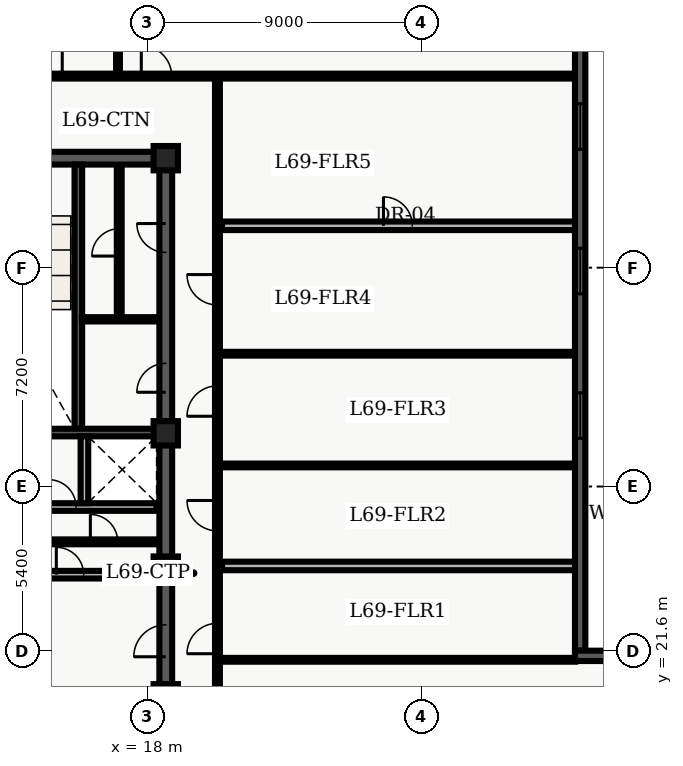
"""IFC4 building model, lengths in metres.
Left out: names, types, materials, properties, quantities, classifications, styles, units other than length and angle.
Written with IfcOpenShell. Run it as: python <this file> out.ifc"""

import sys

from ifc_helpers import new_model, entity, si_unit, converted_unit, direction, frame, origin_with_axes, origin_2d_with_axis, place, context, subcontext, project, spatial, polyline, rectangle, outline, extrude, element, fill, save


model = new_model("IFC4")
c1 = context("Model", 3, precision=1e-05, world=origin_with_axes(), true_north=direction((0.0, 1.0)))
c2 = subcontext(c1, "Body", "Model", "MODEL_VIEW")
j1 = project(units=[si_unit("LENGTHUNIT", "METRE"), converted_unit("PLANEANGLEUNIT", "DEGREE", entity("IfcPlaneAngleMeasure", 0.017), si_unit("PLANEANGLEUNIT", "RADIAN"), dimensions=[0, 0, 0, 0, 0, 0, 0])], contexts=[c1])
p1 = place(None, origin_with_axes())
s1 = spatial("IfcSite", under=j1, at=p1, CompositionType="ELEMENT")
p2 = place(p1, origin_with_axes())
s2 = spatial("IfcBuilding", under=s1, at=p2, CompositionType="ELEMENT")
p3 = place(p2, frame((0.0, 0.0, 280.2), z_axis=(0.0, 0.0, 1.0), x_axis=(1.0, 0.0, 0.0)))
s3 = spatial("IfcBuildingStorey", under=s2, at=p3, CompositionType="ELEMENT", Elevation=280.2)
p4 = place(p3, frame((11.4, 37.8, 0.0), z_axis=(0.0, 0.0, 1.0), x_axis=(1.0, 0.0, 0.0)))
e1 = element("IfcWall", 1, at=p4, inside=s3, PredefinedType="SHEAR", context=c2, shape_type="SweptSolid", body=[
    extrude(outline(polyline([(0.0, -0.21), (7.2, -0.21), (7.2, 0.21), (0.0, 0.21), (0.0, -0.21)])), origin_with_axes(), (0.0, 0.0, 1.0), 3.66),
])
p5 = place(p4, frame((2.625, 0.0, 0.0), z_axis=(0.0, 0.0, 1.0), x_axis=(1.0, 0.0, 0.0)))
e2 = element("IfcOpeningElement", 2, at=p5, cuts=e1, PredefinedType="OPENING", context=c2, shape_type="SweptSolid", body=[
    extrude(rectangle(XDim=1.05, YDim=0.44, at=origin_2d_with_axis()), origin_with_axes(), (0.0, 0.0, 1.0), 2.15),
])
p6 = place(p3, frame((18.6, 10.8, 0.0), z_axis=(0.0, 0.0, 1.0), x_axis=(0.0, 1.0, 0.0)))
e3 = element("IfcWall", 3, at=p6, inside=s3, PredefinedType="SHEAR", context=c2, shape_type="SweptSolid", body=[
    extrude(outline(polyline([(0.0, -0.21), (13.5, -0.21), (13.5, 0.21), (0.0, 0.21), (0.0, -0.21)])), origin_with_axes(), (0.0, 0.0, 1.0), 3.66),
])
p7 = place(p6, frame((1.3, 0.0, 0.0), z_axis=(0.0, 0.0, 1.0), x_axis=(1.0, 0.0, 0.0)))
e4 = element("IfcOpeningElement", 4, at=p7, cuts=e3, PredefinedType="OPENING", context=c2, shape_type="SweptSolid", body=[
    extrude(rectangle(XDim=1.1, YDim=0.44, at=origin_2d_with_axis()), origin_with_axes(), (0.0, 0.0, 1.0), 2.15),
])
p8 = place(p6, frame((3.4, 0.0, 0.0), z_axis=(0.0, 0.0, 1.0), x_axis=(1.0, 0.0, 0.0)))
e5 = element("IfcOpeningElement", 5, at=p8, cuts=e3, PredefinedType="OPENING", context=c2, shape_type="SweptSolid", body=[
    extrude(rectangle(XDim=1.1, YDim=0.44, at=origin_2d_with_axis()), origin_with_axes(), (0.0, 0.0, 1.0), 2.15),
])
p9 = place(p6, frame((11.125, 0.0, 0.0), z_axis=(0.0, 0.0, 1.0), x_axis=(1.0, 0.0, 0.0)))
e6 = element("IfcOpeningElement", 6, at=p9, cuts=e3, PredefinedType="OPENING", context=c2, shape_type="SweptSolid", body=[
    extrude(rectangle(XDim=1.05, YDim=0.44, at=origin_2d_with_axis()), origin_with_axes(), (0.0, 0.0, 1.0), 2.15),
])
p10 = place(p6, frame((6.675, 0.0, 0.0), z_axis=(0.0, 0.0, 1.0), x_axis=(1.0, 0.0, 0.0)))
e7 = element("IfcOpeningElement", 7, at=p10, cuts=e3, PredefinedType="OPENING", context=c2, shape_type="SweptSolid", body=[
    extrude(rectangle(XDim=0.95, YDim=0.44, at=origin_2d_with_axis()), origin_with_axes(), (0.0, 0.0, 1.0), 2.15),
])
p11 = place(p3, frame((18.6, 24.3, 0.0), z_axis=(0.0, 0.0, 1.0), x_axis=(0.0, 1.0, 0.0)))
e8 = element("IfcWall", 8, at=p11, inside=s3, PredefinedType="SHEAR", context=c2, shape_type="SweptSolid", body=[
    extrude(outline(polyline([(0.0, -0.21), (13.5, -0.21), (13.5, 0.21), (0.0, 0.21), (0.0, -0.21)])), origin_with_axes(), (0.0, 0.0, 1.0), 3.66),
])
p12 = place(p11, frame((6.275, 0.0, 0.0), z_axis=(0.0, 0.0, 1.0), x_axis=(1.0, 0.0, 0.0)))
e9 = element("IfcOpeningElement", 9, at=p12, cuts=e8, PredefinedType="OPENING", context=c2, shape_type="SweptSolid", body=[
    extrude(rectangle(XDim=0.95, YDim=0.44, at=origin_2d_with_axis()), origin_with_axes(), (0.0, 0.0, 1.0), 2.15),
])
p13 = place(p11, frame((10.875, 0.0, 0.0), z_axis=(0.0, 0.0, 1.0), x_axis=(1.0, 0.0, 0.0)))
e10 = element("IfcOpeningElement", 10, at=p13, cuts=e8, PredefinedType="OPENING", context=c2, shape_type="SweptSolid", body=[
    extrude(rectangle(XDim=0.95, YDim=0.44, at=origin_2d_with_axis()), origin_with_axes(), (0.0, 0.0, 1.0), 2.15),
])
p14 = place(p3, frame((15.725, 28.9, 0.0), z_axis=(0.0, 0.0, 1.0), x_axis=(0.0, 1.0, 0.0)))
e11 = element("IfcWall", 11, at=p14, inside=s3, PredefinedType="SHEAR", context=c2, shape_type="SweptSolid", body=[
    extrude(outline(polyline([(0.0, -0.125), (8.69, -0.125), (8.69, 0.125), (0.0, 0.125), (0.0, -0.125)])), origin_with_axes(), (0.0, 0.0, 1.0), 3.66),
])
p15 = place(p3, frame((11.61, 28.775, 0.0), z_axis=(0.0, 0.0, 1.0), x_axis=(1.0, 0.0, 0.0)))
e12 = element("IfcWall", 12, at=p15, inside=s3, PredefinedType="SHEAR", context=c2, shape_type="SweptSolid", body=[
    extrude(outline(polyline([(0.0, -0.125), (6.78, -0.125), (6.78, 0.125), (0.0, 0.125), (0.0, -0.125)])), origin_with_axes(), (0.0, 0.0, 1.0), 3.66),
])
p16 = place(p3, frame((11.7, 24.1, 0.0), z_axis=(0.0, 0.0, 1.0), x_axis=(1.0, 0.0, 0.0)))
e13 = element("IfcWall", 13, at=p16, inside=s3, PredefinedType="SOLIDWALL", context=c2, shape_type="SweptSolid", body=[
    extrude(outline(polyline([(0.0, -0.125), (6.6, -0.125), (6.6, 0.125), (0.0, 0.125), (0.0, -0.125)])), origin_with_axes(), (0.0, 0.0, 1.0), 2.7),
])
p17 = place(p16, frame((3.75, 0.0, 0.0), z_axis=(0.0, 0.0, 1.0), x_axis=(1.0, 0.0, 0.0)))
e14 = element("IfcOpeningElement", 14, at=p17, cuts=e13, PredefinedType="OPENING", context=c2, shape_type="SweptSolid", body=[
    extrude(rectangle(XDim=0.9, YDim=0.27, at=origin_2d_with_axis()), origin_with_axes(), (0.0, 0.0, 1.0), 2.15),
])
p18 = place(p3, frame((11.7, 26.325, 0.0), z_axis=(0.0, 0.0, 1.0), x_axis=(1.0, 0.0, 0.0)))
e15 = element("IfcWall", 15, at=p18, inside=s3, PredefinedType="SOLIDWALL", context=c2, shape_type="SweptSolid", body=[
    extrude(outline(polyline([(0.0, -0.125), (6.6, -0.125), (6.6, 0.125), (0.0, 0.125), (0.0, -0.125)])), origin_with_axes(), (0.0, 0.0, 1.0), 2.7),
])
p19 = place(p18, frame((3.5, 0.0, 0.0), z_axis=(0.0, 0.0, 1.0), x_axis=(1.0, 0.0, 0.0)))
e16 = element("IfcOpeningElement", 16, at=p19, cuts=e15, PredefinedType="OPENING", context=c2, shape_type="SweptSolid", body=[
    extrude(rectangle(XDim=0.9, YDim=0.27, at=origin_2d_with_axis()), origin_with_axes(), (0.0, 0.0, 1.0), 2.15),
])
p20 = place(p3, frame((15.925, 26.45, 0.0), z_axis=(0.0, 0.0, 1.0), x_axis=(0.0, 1.0, 0.0)))
e17 = element("IfcWall", 17, at=p20, inside=s3, PredefinedType="SOLIDWALL", context=c2, shape_type="SweptSolid", body=[
    extrude(outline(polyline([(0.0, -0.125), (2.2, -0.125), (2.2, 0.125), (0.0, 0.125), (0.0, -0.125)])), origin_with_axes(), (0.0, 0.0, 1.0), 2.7),
])
for number, where, z_axis, x_axis in (
    (18, (18.6, 20.1, 0.0), (0.0, 0.0, 1.0), (1.0, 0.0, 0.0)),
    (19, (18.6, 24.3, 0.0), (0.0, 0.0, 1.0), (1.0, 0.0, 0.0)),
    (20, (18.6, 28.75, 0.0), (0.0, 0.0, 1.0), (1.0, 0.0, 0.0)),
    (21, (18.6, 37.8, 0.0), (0.0, 0.0, 1.0), (1.0, 0.0, 0.0)),
):
    element("IfcColumn", number, at=place(p3, frame(where, z_axis=z_axis, x_axis=x_axis)), inside=s3, PredefinedType="COLUMN", context=c2, shape_type="SweptSolid", body=[
        extrude(rectangle(XDim=0.8, YDim=0.8, at=origin_2d_with_axis()), origin_with_axes(), (0.0, 0.0, 1.0), 3.9),
    ])
p21 = place(p3, frame((14.62, 25.18, 0.0), z_axis=(0.0, 0.0, 1.0), x_axis=(1.0, 0.0, 0.0)))
e22 = element("IfcWall", 22, at=p21, inside=s3, PredefinedType="PARTITIONING", context=c2, shape_type="SweptSolid", body=[
    extrude(outline(polyline([(0.0, -0.08), (3.68, -0.08), (3.68, 0.08), (0.0, 0.08), (0.0, -0.08)])), origin_with_axes(), (0.0, 0.0, 1.0), 2.7),
])
p22 = place(p21, frame((1.95, 0.0, 0.0), z_axis=(0.0, 0.0, 1.0), x_axis=(1.0, 0.0, 0.0)))
e23 = element("IfcOpeningElement", 23, at=p22, cuts=e22, PredefinedType="OPENING", context=c2, shape_type="SweptSolid", body=[
    extrude(rectangle(XDim=0.9, YDim=0.18, at=origin_2d_with_axis()), origin_with_axes(), (0.0, 0.0, 1.0), 2.15),
])
p23 = place(p3, frame((15.84, 32.5, 0.0), z_axis=(0.0, 0.0, 1.0), x_axis=(1.0, 0.0, 0.0)))
e24 = element("IfcWall", 24, at=p23, inside=s3, PredefinedType="PARTITIONING", context=c2, shape_type="SweptSolid", body=[
    extrude(outline(polyline([(0.0, -0.07), (2.46, -0.07), (2.46, 0.07), (0.0, 0.07), (0.0, -0.07)])), origin_with_axes(), (0.0, 0.0, 1.0), 2.7),
])
p24 = place(p3, frame((17.07, 32.58, 0.0), z_axis=(0.0, 0.0, 1.0), x_axis=(0.0, 1.0, 0.0)))
e25 = element("IfcWall", 25, at=p24, inside=s3, PredefinedType="PARTITIONING", context=c2, shape_type="SweptSolid", body=[
    extrude(outline(polyline([(0.0, -0.08), (4.92, -0.08), (4.92, 0.08), (0.0, 0.08), (0.0, -0.08)])), origin_with_axes(), (0.0, 0.0, 1.0), 2.7),
])
p25 = place(p24, frame((2.45, 0.0, 0.0), z_axis=(0.0, 0.0, 1.0), x_axis=(1.0, 0.0, 0.0)))
e26 = element("IfcOpeningElement", 26, at=p25, cuts=e25, PredefinedType="OPENING", context=c2, shape_type="SweptSolid", body=[
    extrude(rectangle(XDim=0.9, YDim=0.18, at=origin_2d_with_axis()), origin_with_axes(), (0.0, 0.0, 1.0), 2.15),
])
p26 = place(p3, frame((8.135, 40.5, 0.0), z_axis=(0.0, 0.0, 1.0), x_axis=(1.0, 0.0, 0.0)))
e27 = element("IfcWall", 27, at=p26, inside=s3, PredefinedType="PARTITIONING", context=c2, shape_type="SweptSolid", body=[
    extrude(outline(polyline([(0.0, -0.08), (23.93, -0.08), (23.93, 0.08), (0.0, 0.08), (0.0, -0.08)])), origin_with_axes(), (0.0, 0.0, 1.0), 2.7),
])
p27 = place(p26, frame((0.871, 0.0, 0.0), z_axis=(0.0, 0.0, 1.0), x_axis=(1.0, 0.0, 0.0)))
e28 = element("IfcOpeningElement", 28, at=p27, cuts=e27, PredefinedType="OPENING", context=c2, shape_type="SweptSolid", body=[
    extrude(rectangle(XDim=1.0, YDim=0.18, at=origin_2d_with_axis()), origin_with_axes(), (0.0, 0.0, 1.0), 2.15),
])
p28 = place(p26, frame((6.56, 0.0, 0.0), z_axis=(0.0, 0.0, 1.0), x_axis=(1.0, 0.0, 0.0)))
e29 = element("IfcOpeningElement", 29, at=p28, cuts=e27, PredefinedType="OPENING", context=c2, shape_type="SweptSolid", body=[
    extrude(rectangle(XDim=1.0, YDim=0.18, at=origin_2d_with_axis()), origin_with_axes(), (0.0, 0.0, 1.0), 2.15),
])
p29 = place(p26, frame((10.16, 0.0, 0.0), z_axis=(0.0, 0.0, 1.0), x_axis=(1.0, 0.0, 0.0)))
e30 = element("IfcOpeningElement", 30, at=p29, cuts=e27, PredefinedType="OPENING", context=c2, shape_type="SweptSolid", body=[
    extrude(rectangle(XDim=1.0, YDim=0.18, at=origin_2d_with_axis()), origin_with_axes(), (0.0, 0.0, 1.0), 2.15),
])
p30 = place(p3, frame((20.3, 7.8, 0.0), z_axis=(0.0, 0.0, 1.0), x_axis=(0.0, 1.0, 0.0)))
e31 = element("IfcWall", 31, at=p30, inside=s3, PredefinedType="PARTITIONING", context=c2, shape_type="SweptSolid", body=[
    extrude(outline(polyline([(0.0, -0.08), (32.7, -0.08), (32.7, 0.08), (0.0, 0.08), (0.0, -0.08)])), origin_with_axes(), (0.0, 0.0, 1.0), 2.7),
])
p31 = place(p30, frame((14.2, 0.0, 0.0), z_axis=(0.0, 0.0, 1.0), x_axis=(1.0, 0.0, 0.0)))
e32 = element("IfcOpeningElement", 32, at=p31, cuts=e31, PredefinedType="OPENING", context=c2, shape_type="SweptSolid", body=[
    extrude(rectangle(XDim=1.0, YDim=0.18, at=origin_2d_with_axis()), origin_with_axes(), (0.0, 0.0, 1.0), 2.15),
])
p32 = place(p30, frame((18.24, 0.0, 0.0), z_axis=(0.0, 0.0, 1.0), x_axis=(1.0, 0.0, 0.0)))
e33 = element("IfcOpeningElement", 33, at=p32, cuts=e31, PredefinedType="OPENING", context=c2, shape_type="SweptSolid", body=[
    extrude(rectangle(XDim=1.0, YDim=0.18, at=origin_2d_with_axis()), origin_with_axes(), (0.0, 0.0, 1.0), 2.15),
])
p33 = place(p30, frame((22.011, 0.0, 0.0), z_axis=(0.0, 0.0, 1.0), x_axis=(1.0, 0.0, 0.0)))
e34 = element("IfcOpeningElement", 34, at=p33, cuts=e31, PredefinedType="OPENING", context=c2, shape_type="SweptSolid", body=[
    extrude(rectangle(XDim=1.0, YDim=0.18, at=origin_2d_with_axis()), origin_with_axes(), (0.0, 0.0, 1.0), 2.15),
])
p34 = place(p30, frame((25.672, 0.0, 0.0), z_axis=(0.0, 0.0, 1.0), x_axis=(1.0, 0.0, 0.0)))
e35 = element("IfcOpeningElement", 35, at=p34, cuts=e31, PredefinedType="OPENING", context=c2, shape_type="SweptSolid", body=[
    extrude(rectangle(XDim=1.0, YDim=0.18, at=origin_2d_with_axis()), origin_with_axes(), (0.0, 0.0, 1.0), 2.15),
])
p35 = place(p30, frame((6.675, 0.0, 0.0), z_axis=(0.0, 0.0, 1.0), x_axis=(1.0, 0.0, 0.0)))
e36 = element("IfcOpeningElement", 36, at=p35, cuts=e31, PredefinedType="OPENING", context=c2, shape_type="SweptSolid", body=[
    extrude(rectangle(XDim=1.05, YDim=0.18, at=origin_2d_with_axis()), origin_with_axes(), (0.0, 0.0, 1.0), 2.15),
])
p36 = place(p3, frame((17.029, 40.6, 0.0), z_axis=(0.0, 0.0, 1.0), x_axis=(0.0, 1.0, 0.0)))
e37 = element("IfcWall", 37, at=p36, inside=s3, PredefinedType="PARTITIONING", context=c2, shape_type="SweptSolid", body=[
    extrude(outline(polyline([(0.0, -0.062), (5.42, -0.062), (5.42, 0.062), (0.0, 0.062), (0.0, -0.062)])), origin_with_axes(), (0.0, 0.0, 1.0), 2.7),
])
p37 = place(p3, frame((20.45, 24.387, 0.0), z_axis=(0.0, 0.0, 1.0), x_axis=(1.0, 0.0, 0.0)))
e38 = element("IfcWall", 38, at=p37, inside=s3, PredefinedType="PARTITIONING", context=c2, shape_type="SweptSolid", body=[
    extrude(outline(polyline([(0.0, -0.14), (11.615, -0.14), (11.615, 0.14), (0.0, 0.14), (0.0, -0.14)])), origin_with_axes(), (0.0, 0.0, 1.0), 2.7),
])
for number, where, z_axis, x_axis in (
    (39, (20.45, 27.693, 0.0), (0.0, 0.0, 1.0), (1.0, 0.0, 0.0)),
    (40, (20.45, 31.368, 0.0), (0.0, 0.0, 1.0), (1.0, 0.0, 0.0)),
):
    element("IfcWall", number, at=place(p3, frame(where, z_axis=z_axis, x_axis=x_axis)), inside=s3, PredefinedType="PARTITIONING", context=c2, shape_type="SweptSolid", body=[
        extrude(outline(polyline([(0.0, -0.062), (11.615, -0.062), (11.615, 0.062), (0.0, 0.062), (0.0, -0.062)])), origin_with_axes(), (0.0, 0.0, 1.0), 2.7),
    ])
p38 = place(p3, frame((20.45, 35.576, 0.0), z_axis=(0.0, 0.0, 1.0), x_axis=(1.0, 0.0, 0.0)))
e41 = element("IfcWall", 41, at=p38, inside=s3, PredefinedType="PARTITIONING", context=c2, shape_type="SweptSolid", body=[
    extrude(outline(polyline([(0.0, -0.14), (11.615, -0.14), (11.615, 0.14), (0.0, 0.14), (0.0, -0.14)])), origin_with_axes(), (0.0, 0.0, 1.0), 2.7),
])
p39 = place(p38, frame((5.785, 0.0, 0.0), z_axis=(0.0, 0.0, 1.0), x_axis=(1.0, 0.0, 0.0)))
e42 = element("IfcOpeningElement", 42, at=p39, cuts=e41, PredefinedType="OPENING", context=c2, shape_type="SweptSolid", body=[
    extrude(rectangle(XDim=0.95, YDim=0.3, at=origin_2d_with_axis()), origin_with_axes(), (0.0, 0.0, 1.0), 2.15),
])
p40 = place(p3, frame((20.3, 21.3, 0.0), z_axis=(0.0, 0.0, 1.0), x_axis=(1.0, 0.0, 0.0)))
e43 = element("IfcWall", 43, at=p40, inside=s3, PredefinedType="PARTITIONING", context=c2, shape_type="SweptSolid", body=[
    extrude(outline(polyline([(0.0, -0.062), (11.765, -0.062), (11.765, 0.062), (0.0, 0.062), (0.0, -0.062)])), origin_with_axes(), (0.0, 0.0, 1.0), 2.7),
])
p41 = place(p3, frame((32.23, 41.82, 0.0), z_axis=(0.0, 0.0, 1.0), x_axis=(0.0, -1.0, 0.0)))
e44 = element("IfcWall", 44, at=p41, inside=s3, PredefinedType="SOLIDWALL", context=c2, shape_type="SweptSolid", body=[
    extrude(outline(polyline([(0.0, -0.17), (20.22, -0.17), (20.22, 0.17), (0.0, 0.17), (0.0, -0.17)])), origin_with_axes(), (0.0, 0.0, 1.0), 3.66),
])
p42 = place(p41, frame((2.978, 0.0, 0.45), z_axis=(0.0, 0.0, 1.0), x_axis=(1.0, 0.0, 0.0)))
e45 = element("IfcOpeningElement", 45, at=p42, cuts=e44, PredefinedType="OPENING", context=c2, shape_type="SweptSolid", body=[
    extrude(rectangle(XDim=1.5, YDim=0.36, at=origin_2d_with_axis()), origin_with_axes(), (0.0, 0.0, 1.0), 2.1),
])
p43 = place(p41, frame((7.732, 0.0, 0.45), z_axis=(0.0, 0.0, 1.0), x_axis=(1.0, 0.0, 0.0)))
e46 = element("IfcOpeningElement", 46, at=p43, cuts=e44, PredefinedType="OPENING", context=c2, shape_type="SweptSolid", body=[
    extrude(rectangle(XDim=1.5, YDim=0.36, at=origin_2d_with_axis()), origin_with_axes(), (0.0, 0.0, 1.0), 2.1),
])
p44 = place(p41, frame((12.487, 0.0, 0.45), z_axis=(0.0, 0.0, 1.0), x_axis=(1.0, 0.0, 0.0)))
e47 = element("IfcOpeningElement", 47, at=p44, cuts=e44, PredefinedType="OPENING", context=c2, shape_type="SweptSolid", body=[
    extrude(rectangle(XDim=1.5, YDim=0.36, at=origin_2d_with_axis()), origin_with_axes(), (0.0, 0.0, 1.0), 2.1),
])
p45 = place(p3, frame((32.06, 21.43, 0.0), z_axis=(0.0, 0.0, 1.0), x_axis=(1.0, 0.0, 0.0)))
e48 = element("IfcWall", 48, at=p45, inside=s3, PredefinedType="SOLIDWALL", context=c2, shape_type="SweptSolid", body=[
    extrude(outline(polyline([(0.0, -0.17), (2.14, -0.17), (2.14, 0.17), (0.0, 0.17), (0.0, -0.17)])), origin_with_axes(), (0.0, 0.0, 1.0), 3.66),
])
p46 = place(p6, frame((11.125, 0.0, 0.0), z_axis=(0.0, 0.0, 1.0), x_axis=(1.0, 0.0, 0.0)))
e49 = element("IfcDoor", 49, at=p46, inside=s3, OperationType="SINGLE_SWING_LEFT", PredefinedType="DOOR", context=c2, shape_type="SweptSolid", body=[
    extrude(rectangle(XDim=1.05, YDim=0.09, at=origin_2d_with_axis()), origin_with_axes(), (0.0, 0.0, 1.0), 2.15),
])
fill(e6, e49)
p47 = place(p18, frame((3.5, 0.0, 0.0), z_axis=(0.0, 0.0, 1.0), x_axis=(1.0, 0.0, 0.0)))
e50 = element("IfcDoor", 50, at=p47, inside=s3, OperationType="SINGLE_SWING_LEFT", PredefinedType="DOOR", context=c2, shape_type="SweptSolid", body=[
    extrude(rectangle(XDim=0.9, YDim=0.09, at=origin_2d_with_axis()), origin_with_axes(), (0.0, 0.0, 1.0), 2.15),
])
fill(e16, e50)
p48 = place(p16, frame((3.75, 0.0, 0.0), z_axis=(0.0, 0.0, 1.0), x_axis=(1.0, 0.0, 0.0)))
e51 = element("IfcDoor", 51, at=p48, inside=s3, OperationType="SINGLE_SWING_LEFT", PredefinedType="DOOR", context=c2, shape_type="SweptSolid", body=[
    extrude(rectangle(XDim=0.9, YDim=0.09, at=origin_2d_with_axis()), origin_with_axes(), (0.0, 0.0, 1.0), 2.15),
])
fill(e14, e51)
p49 = place(p21, frame((1.95, 0.0, 0.0), z_axis=(0.0, 0.0, 1.0), x_axis=(1.0, 0.0, 0.0)))
e52 = element("IfcDoor", 52, at=p49, inside=s3, OperationType="SINGLE_SWING_LEFT", PredefinedType="DOOR", context=c2, shape_type="SweptSolid", body=[
    extrude(rectangle(XDim=0.9, YDim=0.09, at=origin_2d_with_axis()), origin_with_axes(), (0.0, 0.0, 1.0), 2.15),
])
fill(e23, e52)
p50 = place(p11, frame((6.275, 0.0, 0.0), z_axis=(0.0, 0.0, 1.0), x_axis=(1.0, 0.0, 0.0)))
e53 = element("IfcDoor", 53, at=p50, inside=s3, OperationType="SINGLE_SWING_LEFT", PredefinedType="DOOR", context=c2, shape_type="SweptSolid", body=[
    extrude(rectangle(XDim=0.95, YDim=0.09, at=origin_2d_with_axis()), origin_with_axes(), (0.0, 0.0, 1.0), 2.15),
])
fill(e9, e53)
p51 = place(p24, frame((2.45, 0.0, 0.0), z_axis=(0.0, 0.0, 1.0), x_axis=(1.0, 0.0, 0.0)))
e54 = element("IfcDoor", 54, at=p51, inside=s3, OperationType="SINGLE_SWING_LEFT", PredefinedType="DOOR", context=c2, shape_type="SweptSolid", body=[
    extrude(rectangle(XDim=0.9, YDim=0.09, at=origin_2d_with_axis()), origin_with_axes(), (0.0, 0.0, 1.0), 2.15),
])
fill(e26, e54)
p52 = place(p11, frame((10.875, 0.0, 0.0), z_axis=(0.0, 0.0, 1.0), x_axis=(1.0, 0.0, 0.0)))
e55 = element("IfcDoor", 55, at=p52, inside=s3, OperationType="SINGLE_SWING_RIGHT", PredefinedType="DOOR", context=c2, shape_type="SweptSolid", body=[
    extrude(rectangle(XDim=0.95, YDim=0.09, at=origin_2d_with_axis()), origin_with_axes(), (0.0, 0.0, 1.0), 2.15),
])
fill(e10, e55)
p53 = place(p26, frame((6.56, 0.0, 0.0), z_axis=(0.0, 0.0, 1.0), x_axis=(1.0, 0.0, 0.0)))
e56 = element("IfcDoor", 56, at=p53, inside=s3, OperationType="SINGLE_SWING_RIGHT", PredefinedType="DOOR", context=c2, shape_type="SweptSolid", body=[
    extrude(rectangle(XDim=1.0, YDim=0.09, at=origin_2d_with_axis()), origin_with_axes(), (0.0, 0.0, 1.0), 2.15),
])
fill(e29, e56)
p54 = place(p26, frame((10.16, 0.0, 0.0), z_axis=(0.0, 0.0, 1.0), x_axis=(1.0, 0.0, 0.0)))
e57 = element("IfcDoor", 57, at=p54, inside=s3, OperationType="SINGLE_SWING_LEFT", PredefinedType="DOOR", context=c2, shape_type="SweptSolid", body=[
    extrude(rectangle(XDim=1.0, YDim=0.09, at=origin_2d_with_axis()), origin_with_axes(), (0.0, 0.0, 1.0), 2.15),
])
fill(e30, e57)
p55 = place(p30, frame((14.2, 0.0, 0.0), z_axis=(0.0, 0.0, 1.0), x_axis=(1.0, 0.0, 0.0)))
e58 = element("IfcDoor", 58, at=p55, inside=s3, OperationType="SINGLE_SWING_LEFT", PredefinedType="DOOR", context=c2, shape_type="SweptSolid", body=[
    extrude(rectangle(XDim=1.0, YDim=0.09, at=origin_2d_with_axis()), origin_with_axes(), (0.0, 0.0, 1.0), 2.15),
])
fill(e32, e58)
p56 = place(p30, frame((18.24, 0.0, 0.0), z_axis=(0.0, 0.0, 1.0), x_axis=(1.0, 0.0, 0.0)))
e59 = element("IfcDoor", 59, at=p56, inside=s3, OperationType="SINGLE_SWING_RIGHT", PredefinedType="DOOR", context=c2, shape_type="SweptSolid", body=[
    extrude(rectangle(XDim=1.0, YDim=0.09, at=origin_2d_with_axis()), origin_with_axes(), (0.0, 0.0, 1.0), 2.15),
])
fill(e33, e59)
p57 = place(p30, frame((22.011, 0.0, 0.0), z_axis=(0.0, 0.0, 1.0), x_axis=(1.0, 0.0, 0.0)))
e60 = element("IfcDoor", 60, at=p57, inside=s3, OperationType="SINGLE_SWING_LEFT", PredefinedType="DOOR", context=c2, shape_type="SweptSolid", body=[
    extrude(rectangle(XDim=1.0, YDim=0.09, at=origin_2d_with_axis()), origin_with_axes(), (0.0, 0.0, 1.0), 2.15),
])
fill(e34, e60)
p58 = place(p30, frame((25.672, 0.0, 0.0), z_axis=(0.0, 0.0, 1.0), x_axis=(1.0, 0.0, 0.0)))
e61 = element("IfcDoor", 61, at=p58, inside=s3, OperationType="SINGLE_SWING_RIGHT", PredefinedType="DOOR", context=c2, shape_type="SweptSolid", body=[
    extrude(rectangle(XDim=1.0, YDim=0.09, at=origin_2d_with_axis()), origin_with_axes(), (0.0, 0.0, 1.0), 2.15),
])
fill(e35, e61)
p59 = place(p38, frame((5.785, 0.0, 0.0), z_axis=(0.0, 0.0, 1.0), x_axis=(1.0, 0.0, 0.0)))
e62 = element("IfcDoor", 62, at=p59, inside=s3, OperationType="SINGLE_SWING_LEFT", PredefinedType="DOOR", context=c2, shape_type="SweptSolid", body=[
    extrude(rectangle(XDim=0.95, YDim=0.09, at=origin_2d_with_axis()), origin_with_axes(), (0.0, 0.0, 1.0), 2.15),
])
fill(e42, e62)
p60 = place(p41, frame((2.978, 0.0, 0.45), z_axis=(0.0, 0.0, 1.0), x_axis=(1.0, 0.0, 0.0)))
e63 = element("IfcWindow", 63, at=p60, inside=s3, PredefinedType="WINDOW", context=c2, shape_type="SweptSolid", body=[
    extrude(rectangle(XDim=1.5, YDim=0.09, at=origin_2d_with_axis()), origin_with_axes(), (0.0, 0.0, 1.0), 2.1),
])
fill(e45, e63)
p61 = place(p41, frame((7.732, 0.0, 0.45), z_axis=(0.0, 0.0, 1.0), x_axis=(1.0, 0.0, 0.0)))
e64 = element("IfcWindow", 64, at=p61, inside=s3, PredefinedType="WINDOW", context=c2, shape_type="SweptSolid", body=[
    extrude(rectangle(XDim=1.5, YDim=0.09, at=origin_2d_with_axis()), origin_with_axes(), (0.0, 0.0, 1.0), 2.1),
])
fill(e46, e64)
p62 = place(p41, frame((12.487, 0.0, 0.45), z_axis=(0.0, 0.0, 1.0), x_axis=(1.0, 0.0, 0.0)))
e65 = element("IfcWindow", 65, at=p62, inside=s3, PredefinedType="WINDOW", context=c2, shape_type="SweptSolid", body=[
    extrude(rectangle(XDim=1.5, YDim=0.09, at=origin_2d_with_axis()), origin_with_axes(), (0.0, 0.0, 1.0), 2.1),
])
fill(e47, e65)
save(model, sys.argv[1])
